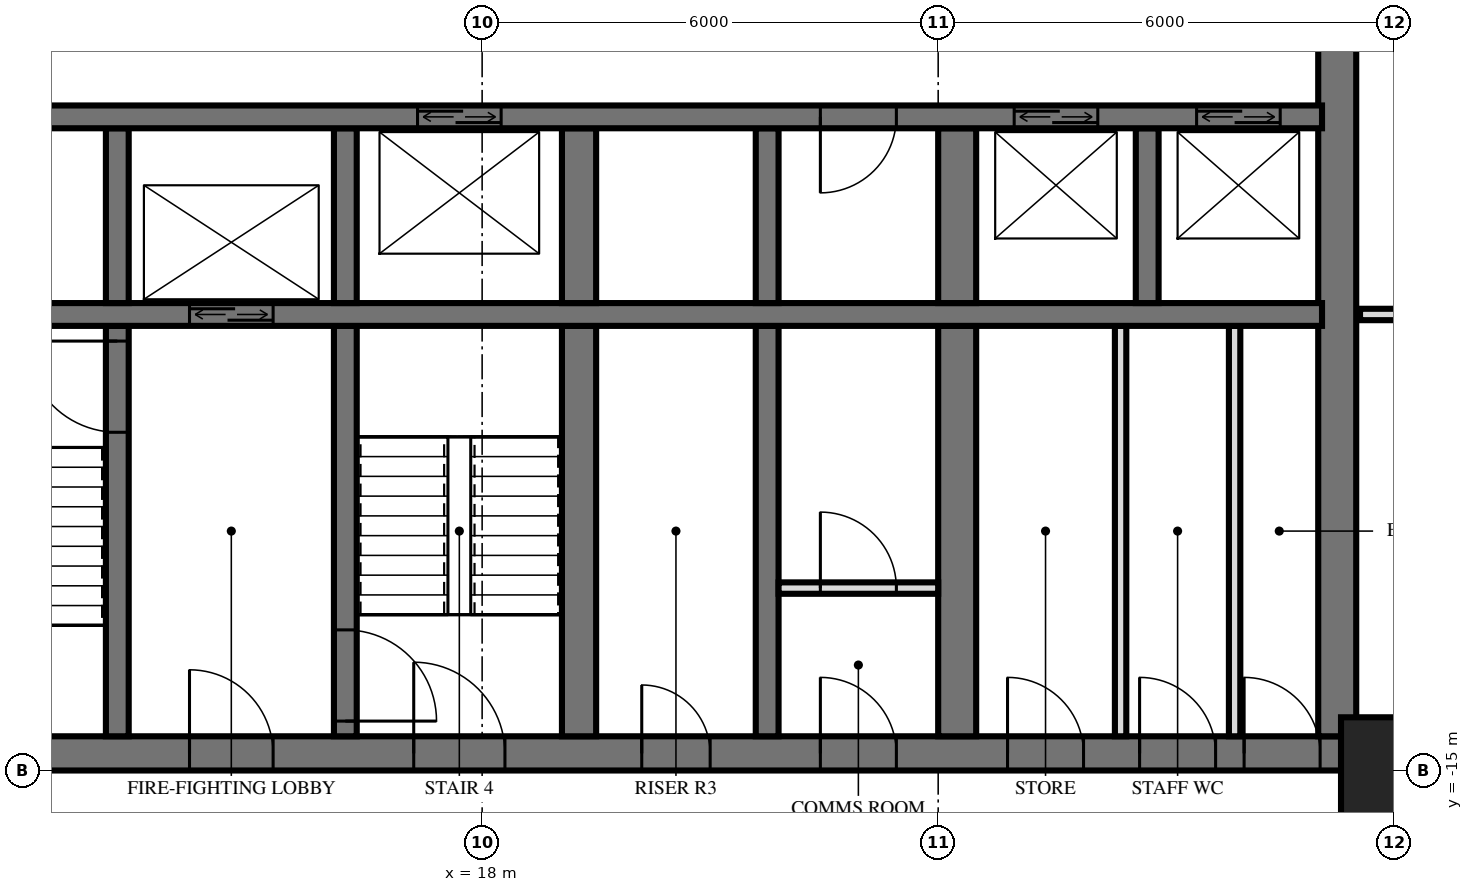
"""IFC4 building model, lengths in metres.
Left out: names, types, materials, properties, quantities, classifications, styles, units other than length and angle.
Written with IfcOpenShell. Run it as: python <this file> out.ifc"""

import sys

from ifc_helpers import new_model, si_unit, direction, frame, frame_2d, origin, origin_2d, place, context, subcontext, project, spatial, rectangle, extrude, element, fill, save


model = new_model("IFC4")
c1 = context("Model", 3, precision=1e-05, world=origin(), true_north=direction((0.0, 1.0)))
c2 = subcontext(c1, "Body", "Model", "MODEL_VIEW")
j1 = project(units=[si_unit("LENGTHUNIT", "METRE"), si_unit("PLANEANGLEUNIT", "RADIAN")], contexts=[c1])
p1 = place(None, origin())
s1 = spatial("IfcSite", under=j1, at=p1, CompositionType="ELEMENT")
p2 = place(p1, origin())
s2 = spatial("IfcBuilding", under=s1, at=p2, CompositionType="ELEMENT")
p3 = place(p2, frame((0.0, 0.0, 42.0)))
s3 = spatial("IfcBuildingStorey", under=s2, at=p3, CompositionType="ELEMENT", Elevation=42.0)
p4 = place(p3, frame((30.0, -15.0, 0.0), z_axis=(0.0, 0.0, 1.0), x_axis=(1.0, 0.0, 0.0)))
e1 = element("IfcColumn", 1, at=p4, inside=s3, PredefinedType="COLUMN", context=c2, shape_type="SweptSolid", body=[
    extrude(rectangle(XDim=1.4, YDim=1.4, at=origin_2d()), origin(), (0.0, 0.0, 1.0), 3.6),
])
p5 = place(p3, frame((10.0, -14.775, 0.0), z_axis=(0.0, 0.0, 1.0), x_axis=(1.0, 0.0, 0.0)))
e2 = element("IfcWall", 2, at=p5, inside=s3, PredefinedType="SHEAR", context=c2, shape_type="SweptSolid", body=[
    extrude(rectangle(XDim=19.5, YDim=0.45, at=frame_2d((9.75, 0.0))), origin(), (0.0, 0.0, 1.0), 3.6),
])
p6 = place(p5, frame((7.1, 0.0, 0.0)))
e3 = element("IfcOpeningElement", 3, at=p6, cuts=e2, PredefinedType="OPENING", context=c2, shape_type="SweptSolid", body=[
    extrude(rectangle(XDim=1.2, YDim=2.1, at=frame_2d((0.6, 1.05))), frame((0.0, 0.235, 0.0), z_axis=(0.0, -1.0, 0.0), x_axis=(1.0, 0.0, 0.0)), (0.0, 0.0, 1.0), 0.47),
])
p7 = place(p5, frame((4.15, 0.0, 0.0)))
e4 = element("IfcOpeningElement", 4, at=p7, cuts=e2, PredefinedType="OPENING", context=c2, shape_type="SweptSolid", body=[
    extrude(rectangle(XDim=1.1, YDim=2.1, at=frame_2d((0.55, 1.05))), frame((0.0, 0.235, 0.0), z_axis=(0.0, -1.0, 0.0), x_axis=(1.0, 0.0, 0.0)), (0.0, 0.0, 1.0), 0.47),
])
p8 = place(p5, frame((10.1, 0.0, 0.0)))
e5 = element("IfcOpeningElement", 5, at=p8, cuts=e2, PredefinedType="OPENING", context=c2, shape_type="SweptSolid", body=[
    extrude(rectangle(XDim=0.9, YDim=2.1, at=frame_2d((0.45, 1.05))), frame((0.0, 0.235, 0.0), z_axis=(0.0, -1.0, 0.0), x_axis=(1.0, 0.0, 0.0)), (0.0, 0.0, 1.0), 0.47),
])
p9 = place(p5, frame((12.45, 0.0, 0.0)))
e6 = element("IfcOpeningElement", 6, at=p9, cuts=e2, PredefinedType="OPENING", context=c2, shape_type="SweptSolid", body=[
    extrude(rectangle(XDim=1.0, YDim=2.1, at=frame_2d((0.5, 1.05))), frame((0.0, 0.235, 0.0), z_axis=(0.0, -1.0, 0.0), x_axis=(1.0, 0.0, 0.0)), (0.0, 0.0, 1.0), 0.47),
])
p10 = place(p5, frame((14.913, 0.0, 0.0)))
e7 = element("IfcOpeningElement", 7, at=p10, cuts=e2, PredefinedType="OPENING", context=c2, shape_type="SweptSolid", body=[
    extrude(rectangle(XDim=1.0, YDim=2.1, at=frame_2d((0.5, 1.05))), frame((0.0, 0.235, 0.0), z_axis=(0.0, -1.0, 0.0), x_axis=(1.0, 0.0, 0.0)), (0.0, 0.0, 1.0), 0.47),
])
p11 = place(p5, frame((16.65, 0.0, 0.0)))
e8 = element("IfcOpeningElement", 8, at=p11, cuts=e2, PredefinedType="OPENING", context=c2, shape_type="SweptSolid", body=[
    extrude(rectangle(XDim=1.0, YDim=2.1, at=frame_2d((0.5, 1.05))), frame((0.0, 0.235, 0.0), z_axis=(0.0, -1.0, 0.0), x_axis=(1.0, 0.0, 0.0)), (0.0, 0.0, 1.0), 0.47),
])
p12 = place(p5, frame((18.025, 0.0, 0.0)))
e9 = element("IfcOpeningElement", 9, at=p12, cuts=e2, PredefinedType="OPENING", context=c2, shape_type="SweptSolid", body=[
    extrude(rectangle(XDim=1.0, YDim=2.1, at=frame_2d((0.5, 1.05))), frame((0.0, 0.235, 0.0), z_axis=(0.0, -1.0, 0.0), x_axis=(1.0, 0.0, 0.0)), (0.0, 0.0, 1.0), 0.47),
])
p13 = place(p3, frame((29.25, -14.55, 0.0), z_axis=(0.0, 0.0, 1.0), x_axis=(0.0, 1.0, 0.0)))
e10 = element("IfcWall", 10, at=p13, inside=s3, PredefinedType="SHEAR", context=c2, shape_type="SweptSolid", body=[
    extrude(rectangle(XDim=14.1, YDim=0.5, at=frame_2d((7.05, 0.0))), origin(), (0.0, 0.0, 1.0), 3.6),
])
p14 = place(p3, frame((10.35, -6.4, 0.0), z_axis=(0.0, 0.0, 1.0), x_axis=(1.0, 0.0, 0.0)))
e11 = element("IfcWall", 11, at=p14, inside=s3, PredefinedType="SHEAR", context=c2, shape_type="SweptSolid", body=[
    extrude(rectangle(XDim=18.7, YDim=0.3, at=frame_2d((9.35, 0.0))), origin(), (0.0, 0.0, 1.0), 3.6),
])
p15 = place(p14, frame((14.65, 0.0, 0.0)))
e12 = element("IfcOpeningElement", 12, at=p15, cuts=e11, PredefinedType="OPENING", context=c2, shape_type="SweptSolid", body=[
    extrude(rectangle(XDim=1.1, YDim=2.1, at=frame_2d((0.55, 1.05))), frame((0.0, 0.16, 0.0), z_axis=(0.0, -1.0, 0.0), x_axis=(1.0, 0.0, 0.0)), (0.0, 0.0, 1.0), 0.32),
])
p16 = place(p14, frame((17.05, 0.0, 0.0)))
e13 = element("IfcOpeningElement", 13, at=p16, cuts=e11, PredefinedType="OPENING", context=c2, shape_type="SweptSolid", body=[
    extrude(rectangle(XDim=1.1, YDim=2.1, at=frame_2d((0.55, 1.05))), frame((0.0, 0.16, 0.0), z_axis=(0.0, -1.0, 0.0), x_axis=(1.0, 0.0, 0.0)), (0.0, 0.0, 1.0), 0.32),
])
p17 = place(p14, frame((6.8, 0.0, 0.0)))
e14 = element("IfcOpeningElement", 14, at=p17, cuts=e11, PredefinedType="OPENING", context=c2, shape_type="SweptSolid", body=[
    extrude(rectangle(XDim=1.1, YDim=2.1, at=frame_2d((0.55, 1.05))), frame((0.0, 0.16, 0.0), z_axis=(0.0, -1.0, 0.0), x_axis=(1.0, 0.0, 0.0)), (0.0, 0.0, 1.0), 0.32),
])
p18 = place(p14, frame((12.1, 0.0, 0.0)))
e15 = element("IfcOpeningElement", 15, at=p18, cuts=e11, PredefinedType="OPENING", context=c2, shape_type="SweptSolid", body=[
    extrude(rectangle(XDim=1.0, YDim=2.1, at=frame_2d((0.5, 1.05))), frame((0.0, 0.16, 0.0), z_axis=(0.0, -1.0, 0.0), x_axis=(1.0, 0.0, 0.0)), (0.0, 0.0, 1.0), 0.32),
])
p19 = place(p3, frame((10.35, -9.0, 0.0), z_axis=(0.0, 0.0, 1.0), x_axis=(1.0, 0.0, 0.0)))
e16 = element("IfcWall", 16, at=p19, inside=s3, PredefinedType="SHEAR", context=c2, shape_type="SweptSolid", body=[
    extrude(rectangle(XDim=18.7, YDim=0.3, at=frame_2d((9.35, 0.0))), origin(), (0.0, 0.0, 1.0), 3.6),
])
p20 = place(p19, frame((3.8, 0.0, 0.0)))
e17 = element("IfcOpeningElement", 17, at=p20, cuts=e16, PredefinedType="OPENING", context=c2, shape_type="SweptSolid", body=[
    extrude(rectangle(XDim=1.1, YDim=2.1, at=frame_2d((0.55, 1.05))), frame((0.0, 0.16, 0.0), z_axis=(0.0, -1.0, 0.0), x_axis=(1.0, 0.0, 0.0)), (0.0, 0.0, 1.0), 0.32),
])
p21 = place(p3, frame((13.2, -8.85, 0.0), z_axis=(0.0, 0.0, 1.0), x_axis=(0.0, 1.0, 0.0)))
e18 = element("IfcWall", 18, at=p21, inside=s3, PredefinedType="SHEAR", context=c2, shape_type="SweptSolid", body=[
    extrude(rectangle(XDim=2.3, YDim=0.3, at=frame_2d((1.15, 0.0))), origin(), (0.0, 0.0, 1.0), 3.6),
])
p22 = place(p3, frame((13.2, -14.55, 0.0), z_axis=(0.0, 0.0, 1.0), x_axis=(0.0, 1.0, 0.0)))
e19 = element("IfcWall", 19, at=p22, inside=s3, PredefinedType="SHEAR", context=c2, shape_type="SweptSolid", body=[
    extrude(rectangle(XDim=5.4, YDim=0.3, at=frame_2d((2.7, 0.0))), origin(), (0.0, 0.0, 1.0), 3.6),
])
p23 = place(p22, frame((4.0, 0.0, 0.0)))
e20 = element("IfcOpeningElement", 20, at=p23, cuts=e19, PredefinedType="OPENING", context=c2, shape_type="SweptSolid", body=[
    extrude(rectangle(XDim=1.2, YDim=2.1, at=frame_2d((0.6, 1.05))), frame((0.0, 0.16, 0.0), z_axis=(0.0, -1.0, 0.0), x_axis=(1.0, 0.0, 0.0)), (0.0, 0.0, 1.0), 0.32),
])
p24 = place(p3, frame((16.2, -8.85, 0.0), z_axis=(0.0, 0.0, 1.0), x_axis=(0.0, 1.0, 0.0)))
e21 = element("IfcWall", 21, at=p24, inside=s3, PredefinedType="SHEAR", context=c2, shape_type="SweptSolid", body=[
    extrude(rectangle(XDim=2.3, YDim=0.3, at=frame_2d((1.15, 0.0))), origin(), (0.0, 0.0, 1.0), 3.6),
])
p25 = place(p3, frame((16.2, -14.55, 0.0), z_axis=(0.0, 0.0, 1.0), x_axis=(0.0, 1.0, 0.0)))
e22 = element("IfcWall", 22, at=p25, inside=s3, PredefinedType="SHEAR", context=c2, shape_type="SweptSolid", body=[
    extrude(rectangle(XDim=5.4, YDim=0.3, at=frame_2d((2.7, 0.0))), origin(), (0.0, 0.0, 1.0), 3.6),
])
p26 = place(p25, frame((0.2, 0.0, 0.0)))
e23 = element("IfcOpeningElement", 23, at=p26, cuts=e22, PredefinedType="OPENING", context=c2, shape_type="SweptSolid", body=[
    extrude(rectangle(XDim=1.2, YDim=2.1, at=frame_2d((0.6, 1.05))), frame((0.0, 0.16, 0.0), z_axis=(0.0, -1.0, 0.0), x_axis=(1.0, 0.0, 0.0)), (0.0, 0.0, 1.0), 0.32),
])
p27 = place(p3, frame((19.275, -8.85, 0.0), z_axis=(0.0, 0.0, 1.0), x_axis=(0.0, 1.0, 0.0)))
e24 = element("IfcWall", 24, at=p27, inside=s3, PredefinedType="SHEAR", context=c2, shape_type="SweptSolid", body=[
    extrude(rectangle(XDim=2.3, YDim=0.45, at=frame_2d((1.15, 0.0))), origin(), (0.0, 0.0, 1.0), 3.6),
])
p28 = place(p3, frame((19.275, -14.55, 0.0), z_axis=(0.0, 0.0, 1.0), x_axis=(0.0, 1.0, 0.0)))
e25 = element("IfcWall", 25, at=p28, inside=s3, PredefinedType="SHEAR", context=c2, shape_type="SweptSolid", body=[
    extrude(rectangle(XDim=5.4, YDim=0.45, at=frame_2d((2.7, 0.0))), origin(), (0.0, 0.0, 1.0), 3.6),
])
p29 = place(p3, frame((21.75, -8.85, 0.0), z_axis=(0.0, 0.0, 1.0), x_axis=(0.0, 1.0, 0.0)))
e26 = element("IfcWall", 26, at=p29, inside=s3, PredefinedType="SHEAR", context=c2, shape_type="SweptSolid", body=[
    extrude(rectangle(XDim=2.3, YDim=0.3, at=frame_2d((1.15, 0.0))), origin(), (0.0, 0.0, 1.0), 3.6),
])
p30 = place(p3, frame((21.75, -14.55, 0.0), z_axis=(0.0, 0.0, 1.0), x_axis=(0.0, 1.0, 0.0)))
e27 = element("IfcWall", 27, at=p30, inside=s3, PredefinedType="SHEAR", context=c2, shape_type="SweptSolid", body=[
    extrude(rectangle(XDim=5.4, YDim=0.3, at=frame_2d((2.7, 0.0))), origin(), (0.0, 0.0, 1.0), 3.6),
])
p31 = place(p3, frame((24.25, -8.85, 0.0), z_axis=(0.0, 0.0, 1.0), x_axis=(0.0, 1.0, 0.0)))
e28 = element("IfcWall", 28, at=p31, inside=s3, PredefinedType="SHEAR", context=c2, shape_type="SweptSolid", body=[
    extrude(rectangle(XDim=2.3, YDim=0.5, at=frame_2d((1.15, 0.0))), origin(), (0.0, 0.0, 1.0), 3.6),
])
p32 = place(p3, frame((24.25, -14.55, 0.0), z_axis=(0.0, 0.0, 1.0), x_axis=(0.0, 1.0, 0.0)))
e29 = element("IfcWall", 29, at=p32, inside=s3, PredefinedType="SHEAR", context=c2, shape_type="SweptSolid", body=[
    extrude(rectangle(XDim=5.4, YDim=0.5, at=frame_2d((2.7, 0.0))), origin(), (0.0, 0.0, 1.0), 3.6),
])
p33 = place(p3, frame((26.75, -8.85, 0.0), z_axis=(0.0, 0.0, 1.0), x_axis=(0.0, 1.0, 0.0)))
e30 = element("IfcWall", 30, at=p33, inside=s3, PredefinedType="SHEAR", context=c2, shape_type="SweptSolid", body=[
    extrude(rectangle(XDim=2.3, YDim=0.3, at=frame_2d((1.15, 0.0))), origin(), (0.0, 0.0, 1.0), 3.6),
])
p34 = place(p3, frame((21.9, -12.6, 0.0), z_axis=(0.0, 0.0, 1.0), x_axis=(1.0, 0.0, 0.0)))
e31 = element("IfcWall", 31, at=p34, inside=s3, PredefinedType="PARTITIONING", context=c2, shape_type="SweptSolid", body=[
    extrude(rectangle(XDim=2.1, YDim=0.15, at=frame_2d((1.05, 0.0))), origin(), (0.0, 0.0, 1.0), 3.3),
])
p35 = place(p34, frame((0.55, 0.0, 0.0)))
e32 = element("IfcOpeningElement", 32, at=p35, cuts=e31, PredefinedType="OPENING", context=c2, shape_type="SweptSolid", body=[
    extrude(rectangle(XDim=1.0, YDim=2.1, at=frame_2d((0.5, 1.05))), frame((0.0, 0.085, 0.0), z_axis=(0.0, -1.0, 0.0), x_axis=(1.0, 0.0, 0.0)), (0.0, 0.0, 1.0), 0.17),
])
for number, where, z_axis, x_axis in (
    (33, (26.4, -14.55, 0.0), (0.0, 0.0, 1.0), (0.0, 1.0, 0.0)),
    (34, (27.9, -14.55, 0.0), (0.0, 0.0, 1.0), (0.0, 1.0, 0.0)),
):
    element("IfcWall", number, at=place(p3, frame(where, z_axis=z_axis, x_axis=x_axis)), inside=s3, PredefinedType="PARTITIONING", context=c2, shape_type="SweptSolid", body=[
        extrude(rectangle(XDim=5.4, YDim=0.15, at=frame_2d((2.7, 0.0))), origin(), (0.0, 0.0, 1.0), 3.3),
    ])
p36 = place(p3, frame((29.55, -15.0, 0.0), z_axis=(0.0, 0.0, 1.0), x_axis=(1.0, 0.0, 0.0)))
e35 = element("IfcWall", 35, at=p36, inside=s3, PredefinedType="PARTITIONING", context=c2, shape_type="SweptSolid", body=[
    extrude(rectangle(XDim=3.57, YDim=0.15, at=frame_2d((1.785, 0.0))), origin(), (0.0, 0.0, 1.0), 3.32),
])
p37 = place(p36, frame((1.205, 0.0, 0.0)))
e36 = element("IfcOpeningElement", 36, at=p37, cuts=e35, PredefinedType="OPENING", context=c2, shape_type="SweptSolid", body=[
    extrude(rectangle(XDim=0.8, YDim=2.1, at=frame_2d((0.4, 1.05))), frame((0.0, 0.085, 0.0), z_axis=(0.0, -1.0, 0.0), x_axis=(1.0, 0.0, 0.0)), (0.0, 0.0, 1.0), 0.17),
])
p38 = place(p3, frame((29.55, -9.0, 0.0), z_axis=(0.0, 0.0, 1.0), x_axis=(1.0, 0.0, 0.0)))
e37 = element("IfcWall", 37, at=p38, inside=s3, PredefinedType="PARTITIONING", context=c2, shape_type="SweptSolid", body=[
    extrude(rectangle(XDim=3.57, YDim=0.15, at=frame_2d((1.785, 0.0))), origin(), (0.0, 0.0, 1.0), 3.32),
])
p39 = place(p38, frame((1.4, 0.0, 0.0)))
e38 = element("IfcOpeningElement", 38, at=p39, cuts=e37, PredefinedType="OPENING", context=c2, shape_type="SweptSolid", body=[
    extrude(rectangle(XDim=0.9, YDim=2.1, at=frame_2d((0.45, 1.05))), frame((0.0, 0.085, 0.0), z_axis=(0.0, -1.0, 0.0), x_axis=(1.0, 0.0, 0.0)), (0.0, 0.0, 1.0), 0.17),
])
p40 = place(p15, origin())
e39 = element("IfcDoor", 39, at=p40, inside=s3, OperationType="DOUBLE_DOOR_SLIDING", PredefinedType="USERDEFINED", context=c2, shape_type="SweptSolid", body=[
    extrude(rectangle(XDim=1.1, YDim=2.1, at=frame_2d((0.55, 1.05))), frame((0.0, 0.025, 0.0), z_axis=(0.0, -1.0, 0.0), x_axis=(1.0, 0.0, 0.0)), (0.0, 0.0, 1.0), 0.05),
])
fill(e12, e39)
p41 = place(p16, origin())
e40 = element("IfcDoor", 40, at=p41, inside=s3, OperationType="DOUBLE_DOOR_SLIDING", PredefinedType="USERDEFINED", context=c2, shape_type="SweptSolid", body=[
    extrude(rectangle(XDim=1.1, YDim=2.1, at=frame_2d((0.55, 1.05))), frame((0.0, 0.025, 0.0), z_axis=(0.0, -1.0, 0.0), x_axis=(1.0, 0.0, 0.0)), (0.0, 0.0, 1.0), 0.05),
])
fill(e13, e40)
p42 = place(p20, origin())
e41 = element("IfcDoor", 41, at=p42, inside=s3, OperationType="DOUBLE_DOOR_SLIDING", PredefinedType="USERDEFINED", context=c2, shape_type="SweptSolid", body=[
    extrude(rectangle(XDim=1.1, YDim=2.1, at=frame_2d((0.55, 1.05))), frame((0.0, 0.025, 0.0), z_axis=(0.0, -1.0, 0.0), x_axis=(1.0, 0.0, 0.0)), (0.0, 0.0, 1.0), 0.05),
])
fill(e17, e41)
p43 = place(p17, origin())
e42 = element("IfcDoor", 42, at=p43, inside=s3, OperationType="DOUBLE_DOOR_SLIDING", PredefinedType="USERDEFINED", context=c2, shape_type="SweptSolid", body=[
    extrude(rectangle(XDim=1.1, YDim=2.1, at=frame_2d((0.55, 1.05))), frame((0.0, 0.025, 0.0), z_axis=(0.0, -1.0, 0.0), x_axis=(1.0, 0.0, 0.0)), (0.0, 0.0, 1.0), 0.05),
])
fill(e14, e42)
p44 = place(p6, origin())
e43 = element("IfcDoor", 43, at=p44, inside=s3, OperationType="SINGLE_SWING_RIGHT", PredefinedType="DOOR", context=c2, shape_type="SweptSolid", body=[
    extrude(rectangle(XDim=1.2, YDim=2.1, at=frame_2d((0.6, 1.05))), frame((0.0, 0.025, 0.0), z_axis=(0.0, -1.0, 0.0), x_axis=(1.0, 0.0, 0.0)), (0.0, 0.0, 1.0), 0.05),
])
fill(e3, e43)
p45 = place(p7, origin())
e44 = element("IfcDoor", 44, at=p45, inside=s3, OperationType="SINGLE_SWING_RIGHT", PredefinedType="DOOR", context=c2, shape_type="SweptSolid", body=[
    extrude(rectangle(XDim=1.1, YDim=2.1, at=frame_2d((0.55, 1.05))), frame((0.0, 0.025, 0.0), z_axis=(0.0, -1.0, 0.0), x_axis=(1.0, 0.0, 0.0)), (0.0, 0.0, 1.0), 0.05),
])
fill(e4, e44)
p46 = place(p8, origin())
e45 = element("IfcDoor", 45, at=p46, inside=s3, OperationType="SINGLE_SWING_RIGHT", PredefinedType="DOOR", context=c2, shape_type="SweptSolid", body=[
    extrude(rectangle(XDim=0.9, YDim=2.1, at=frame_2d((0.45, 1.05))), frame((0.0, 0.025, 0.0), z_axis=(0.0, -1.0, 0.0), x_axis=(1.0, 0.0, 0.0)), (0.0, 0.0, 1.0), 0.05),
])
fill(e5, e45)
p47 = place(p9, origin())
e46 = element("IfcDoor", 46, at=p47, inside=s3, OperationType="SINGLE_SWING_RIGHT", PredefinedType="DOOR", context=c2, shape_type="SweptSolid", body=[
    extrude(rectangle(XDim=1.0, YDim=2.1, at=frame_2d((0.5, 1.05))), frame((0.0, 0.025, 0.0), z_axis=(0.0, -1.0, 0.0), x_axis=(1.0, 0.0, 0.0)), (0.0, 0.0, 1.0), 0.05),
])
fill(e6, e46)
p48 = place(p10, origin())
e47 = element("IfcDoor", 47, at=p48, inside=s3, OperationType="SINGLE_SWING_RIGHT", PredefinedType="DOOR", context=c2, shape_type="SweptSolid", body=[
    extrude(rectangle(XDim=1.0, YDim=2.1, at=frame_2d((0.5, 1.05))), frame((0.0, 0.025, 0.0), z_axis=(0.0, -1.0, 0.0), x_axis=(1.0, 0.0, 0.0)), (0.0, 0.0, 1.0), 0.05),
])
fill(e7, e47)
p49 = place(p11, origin())
e48 = element("IfcDoor", 48, at=p49, inside=s3, OperationType="SINGLE_SWING_RIGHT", PredefinedType="DOOR", context=c2, shape_type="SweptSolid", body=[
    extrude(rectangle(XDim=1.0, YDim=2.1, at=frame_2d((0.5, 1.05))), frame((0.0, 0.025, 0.0), z_axis=(0.0, -1.0, 0.0), x_axis=(1.0, 0.0, 0.0)), (0.0, 0.0, 1.0), 0.05),
])
fill(e8, e48)
p50 = place(p12, origin())
e49 = element("IfcDoor", 49, at=p50, inside=s3, OperationType="SINGLE_SWING_RIGHT", PredefinedType="DOOR", context=c2, shape_type="SweptSolid", body=[
    extrude(rectangle(XDim=1.0, YDim=2.1, at=frame_2d((0.5, 1.05))), frame((0.0, 0.025, 0.0), z_axis=(0.0, -1.0, 0.0), x_axis=(1.0, 0.0, 0.0)), (0.0, 0.0, 1.0), 0.05),
])
fill(e9, e49)
p51 = place(p18, frame((0.5, 0.0, 0.0), z_axis=(0.0, 0.0, 1.0), x_axis=(-1.0, 0.0, 0.0)))
e50 = element("IfcDoor", 50, at=p51, inside=s3, OperationType="SINGLE_SWING_LEFT", PredefinedType="DOOR", context=c2, shape_type="SweptSolid", body=[
    extrude(rectangle(XDim=1.0, YDim=2.1, at=frame_2d((0.0, 1.05))), frame((0.0, -0.025, 0.0), z_axis=(0.0, 1.0, 0.0), x_axis=(-1.0, 0.0, 0.0)), (0.0, 0.0, 1.0), 0.05),
])
fill(e15, e50)
p52 = place(p23, origin())
e51 = element("IfcDoor", 51, at=p52, inside=s3, OperationType="SINGLE_SWING_LEFT", PredefinedType="DOOR", context=c2, shape_type="SweptSolid", body=[
    extrude(rectangle(XDim=1.2, YDim=2.1, at=frame_2d((0.6, 1.05))), frame((0.0, 0.025, 0.0), z_axis=(0.0, -1.0, 0.0), x_axis=(1.0, 0.0, 0.0)), (0.0, 0.0, 1.0), 0.05),
])
fill(e20, e51)
p53 = place(p26, frame((0.6, 0.0, 0.0), z_axis=(0.0, 0.0, 1.0), x_axis=(-1.0, 0.0, 0.0)))
e52 = element("IfcDoor", 52, at=p53, inside=s3, OperationType="SINGLE_SWING_LEFT", PredefinedType="DOOR", context=c2, shape_type="SweptSolid", body=[
    extrude(rectangle(XDim=1.2, YDim=2.1, at=frame_2d((0.0, 1.05))), frame((0.0, -0.025, 0.0), z_axis=(0.0, 1.0, 0.0), x_axis=(-1.0, 0.0, 0.0)), (0.0, 0.0, 1.0), 0.05),
])
fill(e23, e52)
p54 = place(p35, origin())
e53 = element("IfcDoor", 53, at=p54, inside=s3, OperationType="SINGLE_SWING_RIGHT", PredefinedType="DOOR", context=c2, shape_type="SweptSolid", body=[
    extrude(rectangle(XDim=1.0, YDim=2.1, at=frame_2d((0.5, 1.05))), frame((0.0, 0.025, 0.0), z_axis=(0.0, -1.0, 0.0), x_axis=(1.0, 0.0, 0.0)), (0.0, 0.0, 1.0), 0.05),
])
fill(e32, e53)
save(model, sys.argv[1])
